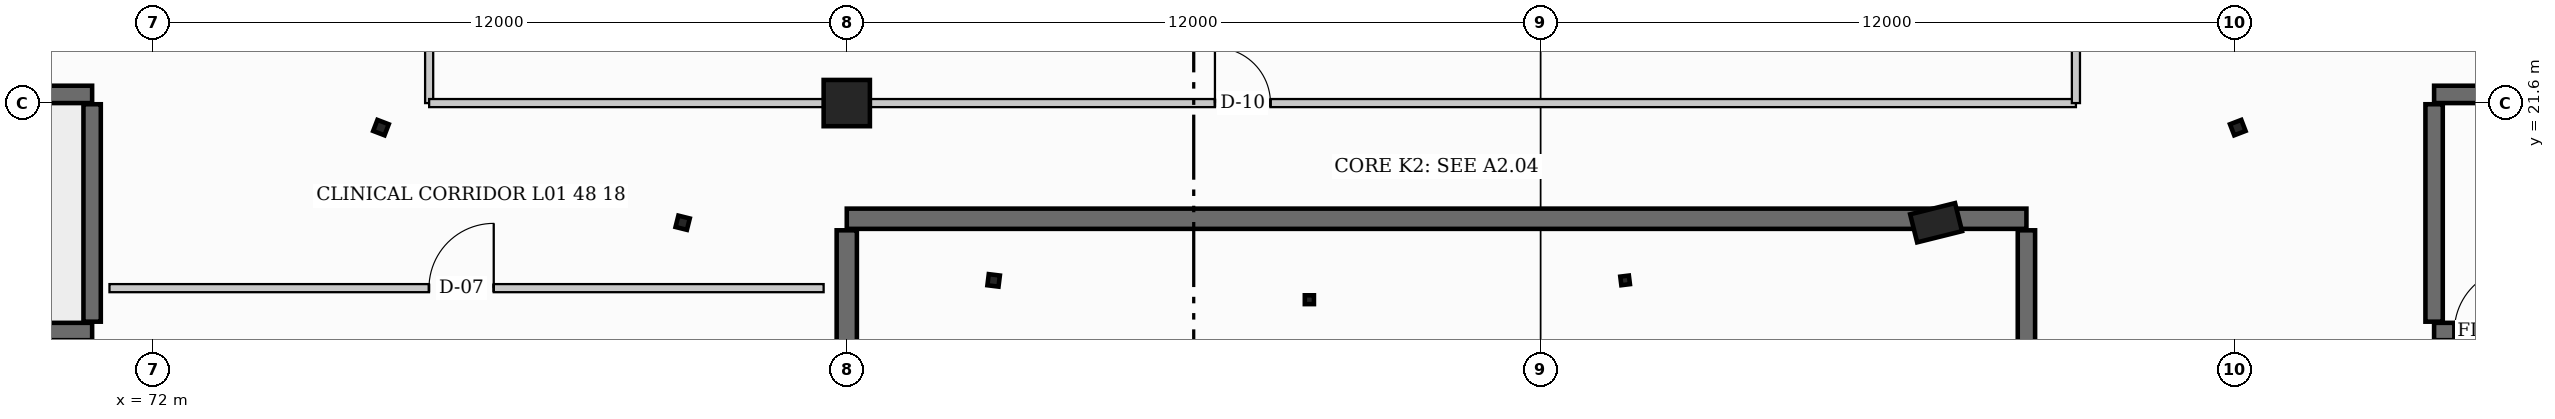
"""IFC4 building model, lengths in metres.
Left out: names, types, materials, properties, quantities, classifications, styles, units other than length and angle.
Written with IfcOpenShell. Run it as: python <this file> out.ifc"""

import sys

from ifc_helpers import new_model, si_unit, direction, frame, frame_2d, origin, origin_2d, place, context, subcontext, project, spatial, rectangle, hollow_rectangle, hollow_circle, i_section, extrude, element, fill, save


model = new_model("IFC4")
c1 = context("Model", 3, precision=1e-05, world=origin(), true_north=direction((0.0, 1.0)))
c2 = subcontext(c1, "Body", "Model", "MODEL_VIEW")
j1 = project(units=[si_unit("LENGTHUNIT", "METRE"), si_unit("PLANEANGLEUNIT", "RADIAN")], contexts=[c1])
p1 = place(None, origin())
s1 = spatial("IfcSite", under=j1, at=p1, CompositionType="ELEMENT")
p2 = place(p1, origin())
s2 = spatial("IfcBuilding", under=s1, at=p2, CompositionType="ELEMENT")
p3 = place(p2, frame((0.0, 0.0, 4.8)))
s3 = spatial("IfcBuildingStorey", under=s2, at=p3, CompositionType="ELEMENT", Elevation=4.8)
p4 = place(p3, frame((84.0, 21.6, 0.0), z_axis=(0.0, 0.0, 1.0), x_axis=(0.0, 1.0, 0.0)))
e1 = element("IfcColumn", 1, at=p4, inside=s3, PredefinedType="COLUMN", context=c2, shape_type="SweptSolid", body=[
    extrude(rectangle(XDim=0.8, YDim=0.8, at=origin_2d()), origin(), (0.0, 0.0, 1.0), 4.8),
])
p5 = place(p3, frame((75.945, 21.176, 0.0), z_axis=(0.0, 0.0, 1.0), x_axis=(0.358367949545, 0.933580426497, 0.0)))
e2 = element("IfcColumn", 2, at=p5, inside=s3, PredefinedType="COLUMN", context=c2, shape_type="SweptSolid", body=[
    extrude(i_section(OverallWidth=0.205, OverallDepth=0.21, WebThickness=0.009, FlangeThickness=0.014, at=origin_2d()), origin(), (0.0, 0.0, 1.0), 4.8),
])
p6 = place(p3, frame((81.162, 19.531, 0.0), z_axis=(0.0, 0.0, 1.0), x_axis=(0.2419218956, 0.970295726276, 0.0)))
e3 = element("IfcColumn", 3, at=p6, inside=s3, PredefinedType="COLUMN", context=c2, shape_type="SweptSolid", body=[
    extrude(i_section(OverallWidth=0.203, OverallDepth=0.203, WebThickness=0.007, FlangeThickness=0.011, at=origin_2d()), origin(), (0.0, 0.0, 1.0), 4.8),
])
p7 = place(p3, frame((86.54, 18.534, 0.0), z_axis=(0.0, 0.0, 1.0), x_axis=(0.121869343405, 0.992546151641, 0.0)))
e4 = element("IfcColumn", 4, at=p7, inside=s3, PredefinedType="COLUMN", context=c2, shape_type="SweptSolid", body=[
    extrude(hollow_circle(Radius=0.097, WallThickness=0.008, at=origin_2d()), origin(), (0.0, 0.0, 1.0), 4.8),
])
p8 = place(p3, frame((92.0, 18.2, 0.0), z_axis=(0.0, 0.0, 1.0), x_axis=(0.0, 1.0, 0.0)))
e5 = element("IfcColumn", 5, at=p8, inside=s3, PredefinedType="COLUMN", context=c2, shape_type="SweptSolid", body=[
    extrude(i_section(OverallWidth=0.153, OverallDepth=0.158, WebThickness=0.007, FlangeThickness=0.01, at=origin_2d()), origin(), (0.0, 0.0, 1.0), 4.8),
])
p9 = place(p3, frame((97.46, 18.534, 0.0), z_axis=(0.0, 0.0, 1.0), x_axis=(-0.121869343405, 0.992546151641, 0.0)))
e6 = element("IfcColumn", 6, at=p9, inside=s3, PredefinedType="COLUMN", context=c2, shape_type="SweptSolid", body=[
    extrude(hollow_rectangle(XDim=0.15, YDim=0.15, WallThickness=0.008, at=origin_2d()), origin(), (0.0, 0.0, 1.0), 4.8),
])
p10 = place(p3, frame((102.838, 19.531, 0.0), z_axis=(0.0, 0.0, 1.0), x_axis=(-0.2419218956, 0.970295726276, 0.0)))
e7 = element("IfcColumn", 7, at=p10, inside=s3, PredefinedType="PILASTER", context=c2, shape_type="SweptSolid", body=[
    extrude(rectangle(XDim=0.5, YDim=0.8, at=origin_2d()), origin(), (0.0, 0.0, 1.0), 4.8),
])
p11 = place(p3, frame((108.055, 21.176, 0.0), z_axis=(0.0, 0.0, 1.0), x_axis=(-0.358367949545, 0.933580426497, 0.0)))
e8 = element("IfcColumn", 8, at=p11, inside=s3, PredefinedType="COLUMN", context=c2, shape_type="SweptSolid", body=[
    extrude(i_section(OverallWidth=0.205, OverallDepth=0.21, WebThickness=0.009, FlangeThickness=0.014, at=origin_2d()), origin(), (0.0, 0.0, 1.0), 4.8),
])
p12 = place(p3, frame((84.0, 19.6, 0.0), z_axis=(0.0, 0.0, 1.0), x_axis=(1.0, 0.0, 0.0)))
e9 = element("IfcWall", 9, at=p12, inside=s3, PredefinedType="SHEAR", context=c2, shape_type="SweptSolid", body=[
    extrude(rectangle(XDim=20.4, YDim=0.35, at=frame_2d((10.2, 0.0))), origin(), (0.0, 0.0, 1.0), 4.8),
])
p13 = place(p3, frame((84.0, 8.8, 0.0), z_axis=(0.0, 0.0, 1.0), x_axis=(0.0, 1.0, 0.0)))
e10 = element("IfcWall", 10, at=p13, inside=s3, PredefinedType="SHEAR", context=c2, shape_type="SweptSolid", body=[
    extrude(rectangle(XDim=10.6, YDim=0.35, at=frame_2d((5.3, 0.0))), origin(), (0.0, 0.0, 1.0), 4.8),
])
p14 = place(p3, frame((104.4, 19.4, 0.0), z_axis=(0.0, 0.0, 1.0), x_axis=(0.0, -1.0, 0.0)))
e11 = element("IfcWall", 11, at=p14, inside=s3, PredefinedType="SHEAR", context=c2, shape_type="SweptSolid", body=[
    extrude(rectangle(XDim=10.6, YDim=0.3, at=frame_2d((5.3, 0.0))), origin(), (0.0, 0.0, 1.0), 4.8),
])
p15 = place(p3, frame((62.25, 17.65, 0.0), z_axis=(0.0, 0.0, 1.0), x_axis=(1.0, 0.0, 0.0)))
e12 = element("IfcWall", 12, at=p15, inside=s3, PredefinedType="SHEAR", context=c2, shape_type="SweptSolid", body=[
    extrude(rectangle(XDim=8.7, YDim=0.3, at=frame_2d((4.35, 0.0))), origin(), (0.0, 0.0, 1.0), 4.8),
])
p16 = place(p15, frame((0.35, 0.0, 0.0)))
e13 = element("IfcOpeningElement", 13, at=p16, cuts=e12, PredefinedType="OPENING", context=c2, shape_type="SweptSolid", body=[
    extrude(rectangle(XDim=1.1, YDim=2.15, at=frame_2d((0.55, 1.075))), frame((0.0, 0.16, 0.0), z_axis=(0.0, -1.0, 0.0), x_axis=(1.0, 0.0, 0.0)), (0.0, 0.0, 1.0), 0.32),
])
p17 = place(p3, frame((70.95, 21.75, 0.0), z_axis=(0.0, 0.0, 1.0), x_axis=(-1.0, 0.0, 0.0)))
e14 = element("IfcWall", 14, at=p17, inside=s3, PredefinedType="SHEAR", context=c2, shape_type="SweptSolid", body=[
    extrude(rectangle(XDim=8.7, YDim=0.3, at=frame_2d((4.35, 0.0))), origin(), (0.0, 0.0, 1.0), 4.8),
])
p18 = place(p3, frame((70.95, 17.82, 0.0), z_axis=(0.0, 0.0, 1.0), x_axis=(0.0, 1.0, 0.0)))
e15 = element("IfcWall", 15, at=p18, inside=s3, PredefinedType="SHEAR", context=c2, shape_type="SweptSolid", body=[
    extrude(rectangle(XDim=3.76, YDim=0.3, at=frame_2d((1.88, 0.0))), origin(), (0.0, 0.0, 1.0), 4.8),
])
p19 = place(p3, frame((111.45, 17.65, 0.0), z_axis=(0.0, 0.0, 1.0), x_axis=(1.0, 0.0, 0.0)))
e16 = element("IfcWall", 16, at=p19, inside=s3, PredefinedType="SHEAR", context=c2, shape_type="SweptSolid", body=[
    extrude(rectangle(XDim=8.7, YDim=0.3, at=frame_2d((4.35, 0.0))), origin(), (0.0, 0.0, 1.0), 4.8),
])
p20 = place(p19, frame((0.35, 0.0, 0.0)))
e17 = element("IfcOpeningElement", 17, at=p20, cuts=e16, PredefinedType="OPENING", context=c2, shape_type="SweptSolid", body=[
    extrude(rectangle(XDim=1.1, YDim=2.15, at=frame_2d((0.55, 1.075))), frame((0.0, 0.16, 0.0), z_axis=(0.0, -1.0, 0.0), x_axis=(1.0, 0.0, 0.0)), (0.0, 0.0, 1.0), 0.32),
])
p21 = place(p3, frame((120.15, 21.75, 0.0), z_axis=(0.0, 0.0, 1.0), x_axis=(-1.0, 0.0, 0.0)))
e18 = element("IfcWall", 18, at=p21, inside=s3, PredefinedType="SHEAR", context=c2, shape_type="SweptSolid", body=[
    extrude(rectangle(XDim=8.7, YDim=0.3, at=frame_2d((4.35, 0.0))), origin(), (0.0, 0.0, 1.0), 4.8),
])
p22 = place(p3, frame((111.45, 17.82, 0.0), z_axis=(0.0, 0.0, 1.0), x_axis=(0.0, 1.0, 0.0)))
e19 = element("IfcWall", 19, at=p22, inside=s3, PredefinedType="SHEAR", context=c2, shape_type="SweptSolid", body=[
    extrude(rectangle(XDim=3.76, YDim=0.3, at=frame_2d((1.88, 0.0))), origin(), (0.0, 0.0, 1.0), 4.8),
])
p23 = place(p3, frame((71.25, 18.4, 0.0), z_axis=(0.0, 0.0, 1.0), x_axis=(1.0, 0.0, 0.0)))
e20 = element("IfcWall", 20, at=p23, inside=s3, PredefinedType="PARTITIONING", context=c2, shape_type="SweptSolid", body=[
    extrude(rectangle(XDim=12.35, YDim=0.14, at=frame_2d((6.175, 0.0))), origin(), (0.0, 0.0, 1.0), 4.43),
])
p24 = place(p23, frame((5.525, 0.0, 0.0)))
e21 = element("IfcOpeningElement", 21, at=p24, cuts=e20, PredefinedType="OPENING", context=c2, shape_type="SweptSolid", body=[
    extrude(rectangle(XDim=1.12, YDim=2.08, at=frame_2d((0.56, 1.04))), frame((0.0, 0.08, 0.0), z_axis=(0.0, -1.0, 0.0), x_axis=(1.0, 0.0, 0.0)), (0.0, 0.0, 1.0), 0.16),
])
p25 = place(p3, frame((76.778, 21.6, 0.0), z_axis=(0.0, 0.0, 1.0), x_axis=(0.0, 1.0, 0.0)))
e22 = element("IfcWall", 22, at=p25, inside=s3, PredefinedType="PARTITIONING", context=c2, shape_type="SweptSolid", body=[
    extrude(rectangle(XDim=23.7, YDim=0.14, at=frame_2d((11.85, 0.0))), origin(), (0.0, 0.0, 1.0), 3.48),
])
p26 = place(p3, frame((76.778, 21.6, 0.0), z_axis=(0.0, 0.0, 1.0), x_axis=(1.0, 0.0, 0.0)))
e23 = element("IfcWall", 23, at=p26, inside=s3, PredefinedType="PARTITIONING", context=c2, shape_type="SweptSolid", body=[
    extrude(rectangle(XDim=28.478, YDim=0.14, at=frame_2d((14.239, 0.0))), origin(), (0.0, 0.0, 1.0), 3.53),
])
p27 = place(p26, frame((13.589, 0.0, 0.0)))
e24 = element("IfcOpeningElement", 24, at=p27, cuts=e23, PredefinedType="OPENING", context=c2, shape_type="SweptSolid", body=[
    extrude(rectangle(XDim=0.96, YDim=2.06, at=frame_2d((0.48, 1.03))), frame((0.0, 0.08, 0.0), z_axis=(0.0, -1.0, 0.0), x_axis=(1.0, 0.0, 0.0)), (0.0, 0.0, 1.0), 0.16),
])
p28 = place(p3, frame((105.256, 21.6, 0.0), z_axis=(0.0, 0.0, 1.0), x_axis=(0.0, 1.0, 0.0)))
e25 = element("IfcWall", 25, at=p28, inside=s3, PredefinedType="PARTITIONING", context=c2, shape_type="SweptSolid", body=[
    extrude(rectangle(XDim=23.7, YDim=0.14, at=frame_2d((11.85, 0.0))), origin(), (0.0, 0.0, 1.0), 3.53),
])
p29 = place(p20, origin())
e26 = element("IfcDoor", 26, at=p29, inside=s3, OperationType="SINGLE_SWING_RIGHT", PredefinedType="DOOR", context=c2, shape_type="SweptSolid", body=[
    extrude(rectangle(XDim=1.1, YDim=2.15, at=frame_2d((0.55, 1.075))), frame((0.0, 0.025, 0.0), z_axis=(0.0, -1.0, 0.0), x_axis=(1.0, 0.0, 0.0)), (0.0, 0.0, 1.0), 0.05),
])
fill(e17, e26)
p30 = place(p24, origin())
e27 = element("IfcDoor", 27, at=p30, inside=s3, OperationType="SINGLE_SWING_RIGHT", PredefinedType="DOOR", context=c2, shape_type="SweptSolid", body=[
    extrude(rectangle(XDim=1.12, YDim=2.08, at=frame_2d((0.56, 1.04))), frame((0.0, 0.025, 0.0), z_axis=(0.0, -1.0, 0.0), x_axis=(1.0, 0.0, 0.0)), (0.0, 0.0, 1.0), 0.05),
])
fill(e21, e27)
p31 = place(p27, origin())
e28 = element("IfcDoor", 28, at=p31, inside=s3, OperationType="SINGLE_SWING_LEFT", PredefinedType="DOOR", context=c2, shape_type="SweptSolid", body=[
    extrude(rectangle(XDim=0.96, YDim=2.06, at=frame_2d((0.48, 1.03))), frame((0.0, 0.025, 0.0), z_axis=(0.0, -1.0, 0.0), x_axis=(1.0, 0.0, 0.0)), (0.0, 0.0, 1.0), 0.05),
])
fill(e24, e28)
save(model, sys.argv[1])
